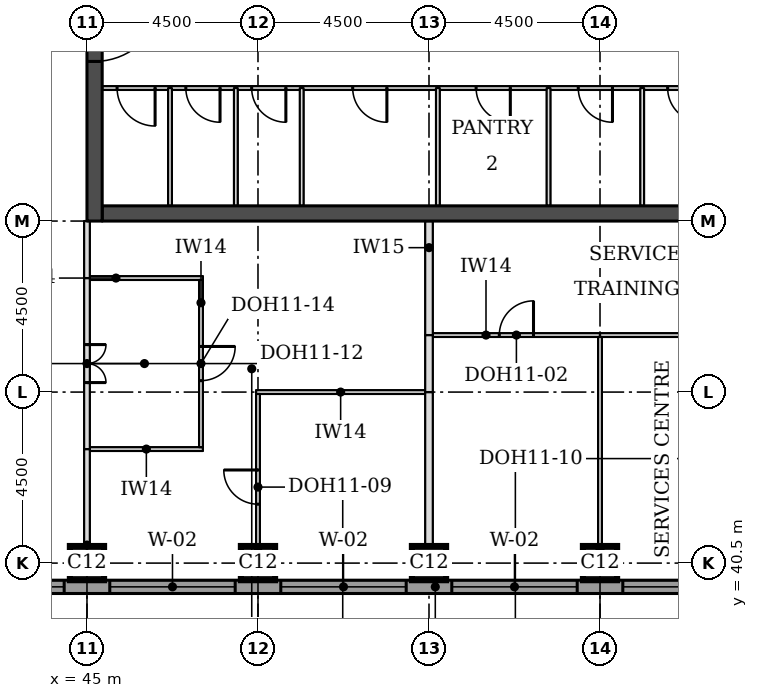
"""IFC4 building model, lengths in metres.
Left out: names, types, materials, properties, quantities, classifications, styles, units other than length and angle.
Written with IfcOpenShell. Run it as: python <this file> out.ifc"""

import sys

from ifc_helpers import new_model, si_unit, direction, frame, frame_2d, origin, origin_2d, place, context, subcontext, project, spatial, rectangle, extrude, element, fill, save


model = new_model("IFC4")
c1 = context("Model", 3, precision=1e-05, world=origin(), true_north=direction((0.0, 1.0)))
c2 = subcontext(c1, "Body", "Model", "MODEL_VIEW")
j1 = project(units=[si_unit("LENGTHUNIT", "METRE"), si_unit("PLANEANGLEUNIT", "RADIAN")], contexts=[c1])
p1 = place(None, origin())
s1 = spatial("IfcSite", under=j1, at=p1, CompositionType="ELEMENT")
p2 = place(p1, origin())
s2 = spatial("IfcBuilding", under=s1, at=p2, CompositionType="ELEMENT")
p3 = place(p2, frame((0.0, 0.0, 234.1)))
s3 = spatial("IfcBuildingStorey", under=s2, at=p3, CompositionType="ELEMENT", Elevation=234.1)
for number, where, z_axis, x_axis in (
    (1, (45.0, 40.5, 0.0), (0.0, 0.0, 1.0), (1.0, 0.0, 0.0)),
    (2, (49.5, 40.5, 0.0), (0.0, 0.0, 1.0), (1.0, 0.0, 0.0)),
    (3, (54.0, 40.5, 0.0), (0.0, 0.0, 1.0), (1.0, 0.0, 0.0)),
    (4, (58.5, 40.5, 0.0), (0.0, 0.0, 1.0), (1.0, 0.0, 0.0)),
):
    element("IfcColumn", number, at=place(p3, frame(where, z_axis=z_axis, x_axis=x_axis)), inside=s3, PredefinedType="COLUMN", context=c2, shape_type="SweptSolid", body=[
        extrude(rectangle(XDim=0.9, YDim=0.9, at=origin_2d()), origin(), (0.0, 0.0, 1.0), 3.7),
    ])
p4 = place(p3, frame((45.4, 49.7, 0.0), z_axis=(0.0, 0.0, 1.0), x_axis=(1.0, 0.0, 0.0)))
e5 = element("IfcWall", 5, at=p4, inside=s3, PredefinedType="SHEAR", context=c2, shape_type="SweptSolid", body=[
    extrude(rectangle(XDim=21.7, YDim=0.4, at=frame_2d((10.85, 0.0))), origin(), (0.0, 0.0, 1.0), 3.7),
])
p5 = place(p3, frame((45.2, 49.5, 0.0), z_axis=(0.0, 0.0, 1.0), x_axis=(0.0, 1.0, 0.0)))
e6 = element("IfcWall", 6, at=p5, inside=s3, PredefinedType="SHEAR", context=c2, shape_type="SweptSolid", body=[
    extrude(rectangle(XDim=22.5, YDim=0.4, at=frame_2d((11.25, 0.0))), origin(), (0.0, 0.0, 1.0), 3.7),
])
p6 = place(p5, frame((4.2, 0.0, 0.0)))
e7 = element("IfcOpeningElement", 7, at=p6, cuts=e6, PredefinedType="OPENING", context=c2, shape_type="SweptSolid", body=[
    extrude(rectangle(XDim=1.8, YDim=2.1, at=frame_2d((0.9, 1.05))), frame((0.0, 0.21, 0.0), z_axis=(0.0, -1.0, 0.0), x_axis=(1.0, 0.0, 0.0)), (0.0, 0.0, 1.0), 0.42),
])
p7 = place(p5, frame((6.9, 0.0, 0.0)))
e8 = element("IfcOpeningElement", 8, at=p7, cuts=e6, PredefinedType="OPENING", context=c2, shape_type="SweptSolid", body=[
    extrude(rectangle(XDim=1.1, YDim=2.1, at=frame_2d((0.55, 1.05))), frame((0.0, 0.21, 0.0), z_axis=(0.0, -1.0, 0.0), x_axis=(1.0, 0.0, 0.0)), (0.0, 0.0, 1.0), 0.42),
])
p8 = place(p5, frame((13.6, 0.0, 0.0)))
e9 = element("IfcOpeningElement", 9, at=p8, cuts=e6, PredefinedType="OPENING", context=c2, shape_type="SweptSolid", body=[
    extrude(rectangle(XDim=1.1, YDim=2.1, at=frame_2d((0.55, 1.05))), frame((0.0, 0.21, 0.0), z_axis=(0.0, -1.0, 0.0), x_axis=(1.0, 0.0, 0.0)), (0.0, 0.0, 1.0), 0.42),
])
p9 = place(p5, frame((16.5, 0.0, 0.0)))
e10 = element("IfcOpeningElement", 10, at=p9, cuts=e6, PredefinedType="OPENING", context=c2, shape_type="SweptSolid", body=[
    extrude(rectangle(XDim=1.8, YDim=2.1, at=frame_2d((0.9, 1.05))), frame((0.0, 0.21, 0.0), z_axis=(0.0, -1.0, 0.0), x_axis=(1.0, 0.0, 0.0)), (0.0, 0.0, 1.0), 0.42),
])
p10 = place(p3, frame((36.0, 39.875, 0.0), z_axis=(0.0, 0.0, 1.0), x_axis=(1.0, 0.0, 0.0)))
e11 = element("IfcWall", 11, at=p10, inside=s3, PredefinedType="STANDARD", context=c2, shape_type="SweptSolid", body=[
    extrude(rectangle(XDim=36.331, YDim=0.35, at=frame_2d((18.166, 0.0))), origin(), (0.0, 0.0, 1.0), 3.525),
])
p11 = place(p10, frame((5.1, 0.0, 0.9)))
e12 = element("IfcOpeningElement", 12, at=p11, cuts=e11, PredefinedType="OPENING", context=c2, shape_type="SweptSolid", body=[
    extrude(rectangle(XDim=3.3, YDim=1.9, at=frame_2d((1.65, 0.95))), frame((0.0, 0.185, 0.0), z_axis=(0.0, -1.0, 0.0), x_axis=(1.0, 0.0, 0.0)), (0.0, 0.0, 1.0), 0.37),
])
p12 = place(p10, frame((9.6, 0.0, 0.9)))
e13 = element("IfcOpeningElement", 13, at=p12, cuts=e11, PredefinedType="OPENING", context=c2, shape_type="SweptSolid", body=[
    extrude(rectangle(XDim=3.3, YDim=1.9, at=frame_2d((1.65, 0.95))), frame((0.0, 0.185, 0.0), z_axis=(0.0, -1.0, 0.0), x_axis=(1.0, 0.0, 0.0)), (0.0, 0.0, 1.0), 0.37),
])
p13 = place(p10, frame((14.1, 0.0, 0.9)))
e14 = element("IfcOpeningElement", 14, at=p13, cuts=e11, PredefinedType="OPENING", context=c2, shape_type="SweptSolid", body=[
    extrude(rectangle(XDim=3.3, YDim=1.9, at=frame_2d((1.65, 0.95))), frame((0.0, 0.185, 0.0), z_axis=(0.0, -1.0, 0.0), x_axis=(1.0, 0.0, 0.0)), (0.0, 0.0, 1.0), 0.37),
])
p14 = place(p10, frame((18.6, 0.0, 0.9)))
e15 = element("IfcOpeningElement", 15, at=p14, cuts=e11, PredefinedType="OPENING", context=c2, shape_type="SweptSolid", body=[
    extrude(rectangle(XDim=3.3, YDim=1.9, at=frame_2d((1.65, 0.95))), frame((0.0, 0.185, 0.0), z_axis=(0.0, -1.0, 0.0), x_axis=(1.0, 0.0, 0.0)), (0.0, 0.0, 1.0), 0.37),
])
p15 = place(p10, frame((23.1, 0.0, 0.9)))
e16 = element("IfcOpeningElement", 16, at=p15, cuts=e11, PredefinedType="OPENING", context=c2, shape_type="SweptSolid", body=[
    extrude(rectangle(XDim=3.3, YDim=1.9, at=frame_2d((1.65, 0.95))), frame((0.0, 0.185, 0.0), z_axis=(0.0, -1.0, 0.0), x_axis=(1.0, 0.0, 0.0)), (0.0, 0.0, 1.0), 0.37),
])
p16 = place(p10, frame((27.6, 0.0, 0.9)))
e17 = element("IfcOpeningElement", 17, at=p16, cuts=e11, PredefinedType="OPENING", context=c2, shape_type="SweptSolid", body=[
    extrude(rectangle(XDim=3.3, YDim=1.9, at=frame_2d((1.65, 0.95))), frame((0.0, 0.185, 0.0), z_axis=(0.0, -1.0, 0.0), x_axis=(1.0, 0.0, 0.0)), (0.0, 0.0, 1.0), 0.37),
])
p17 = place(p3, frame((45.075, 43.5, 0.0), z_axis=(0.0, 0.0, 1.0), x_axis=(1.0, 0.0, 0.0)))
e18 = element("IfcWall", 18, at=p17, inside=s3, PredefinedType="PARTITIONING", context=c2, shape_type="SweptSolid", body=[
    extrude(rectangle(XDim=2.975, YDim=0.1, at=frame_2d((1.488, 0.0))), origin(), (0.0, 0.0, 1.0), 3.55),
])
p18 = place(p3, frame((49.45, 45.0, 0.0), z_axis=(0.0, 0.0, 1.0), x_axis=(1.0, 0.0, 0.0)))
e19 = element("IfcWall", 19, at=p18, inside=s3, PredefinedType="PARTITIONING", context=c2, shape_type="SweptSolid", body=[
    extrude(rectangle(XDim=4.45, YDim=0.1, at=frame_2d((2.225, 0.0))), origin(), (0.0, 0.0, 1.0), 3.55),
])
p19 = place(p3, frame((54.1, 46.5, 0.0), z_axis=(0.0, 0.0, 1.0), x_axis=(1.0, 0.0, 0.0)))
e20 = element("IfcWall", 20, at=p19, inside=s3, PredefinedType="PARTITIONING", context=c2, shape_type="SweptSolid", body=[
    extrude(rectangle(XDim=4.4, YDim=0.1, at=frame_2d((2.2, 0.0))), origin(), (0.0, 0.0, 1.0), 3.55),
])
p20 = place(p19, frame((1.75, 0.0, 0.0)))
e21 = element("IfcOpeningElement", 21, at=p20, cuts=e20, PredefinedType="OPENING", context=c2, shape_type="SweptSolid", body=[
    extrude(rectangle(XDim=0.9, YDim=2.1, at=frame_2d((0.45, 1.05))), frame((0.0, 0.06, 0.0), z_axis=(0.0, -1.0, 0.0), x_axis=(1.0, 0.0, 0.0)), (0.0, 0.0, 1.0), 0.12),
])
p21 = place(p3, frame((58.5, 46.5, 0.0), z_axis=(0.0, 0.0, 1.0), x_axis=(1.0, 0.0, 0.0)))
e22 = element("IfcWall", 22, at=p21, inside=s3, PredefinedType="PARTITIONING", context=c2, shape_type="SweptSolid", body=[
    extrude(rectangle(XDim=4.55, YDim=0.1, at=frame_2d((2.275, 0.0))), origin(), (0.0, 0.0, 1.0), 3.55),
])
p22 = place(p3, frame((45.075, 48.0, 0.0), z_axis=(0.0, 0.0, 1.0), x_axis=(1.0, 0.0, 0.0)))
e23 = element("IfcWall", 23, at=p22, inside=s3, PredefinedType="PARTITIONING", context=c2, shape_type="SweptSolid", body=[
    extrude(rectangle(XDim=2.975, YDim=0.1, at=frame_2d((1.488, 0.0))), origin(), (0.0, 0.0, 1.0), 3.55),
])
p23 = place(p3, frame((45.0, 40.05, 0.0), z_axis=(0.0, 0.0, 1.0), x_axis=(0.0, 1.0, 0.0)))
e24 = element("IfcWall", 24, at=p23, inside=s3, PredefinedType="PARTITIONING", context=c2, shape_type="SweptSolid", body=[
    extrude(rectangle(XDim=3.45, YDim=0.15, at=frame_2d((1.725, 0.0))), origin(), (0.0, 0.0, 1.0), 3.022),
])
p24 = place(p3, frame((49.5, 40.05, 0.0), z_axis=(0.0, 0.0, 1.0), x_axis=(0.0, 1.0, 0.0)))
e25 = element("IfcWall", 25, at=p24, inside=s3, PredefinedType="PARTITIONING", context=c2, shape_type="SweptSolid", body=[
    extrude(rectangle(XDim=4.9, YDim=0.1, at=frame_2d((2.45, 0.0))), origin(), (0.0, 0.0, 1.0), 3.55),
])
p25 = place(p24, frame((2.0, 0.0, 0.0)))
e26 = element("IfcOpeningElement", 26, at=p25, cuts=e25, PredefinedType="OPENING", context=c2, shape_type="SweptSolid", body=[
    extrude(rectangle(XDim=0.9, YDim=2.1, at=frame_2d((0.45, 1.05))), frame((0.0, 0.06, 0.0), z_axis=(0.0, -1.0, 0.0), x_axis=(1.0, 0.0, 0.0)), (0.0, 0.0, 1.0), 0.12),
])
p26 = place(p3, frame((54.0, 40.05, 0.0), z_axis=(0.0, 0.0, 1.0), x_axis=(0.0, 1.0, 0.0)))
e27 = element("IfcWall", 27, at=p26, inside=s3, PredefinedType="PARTITIONING", context=c2, shape_type="SweptSolid", body=[
    extrude(rectangle(XDim=4.95, YDim=0.2, at=frame_2d((2.475, 0.0))), origin(), (0.0, 0.0, 1.0), 3.55),
])
p27 = place(p3, frame((58.5, 40.05, 0.0), z_axis=(0.0, 0.0, 1.0), x_axis=(0.0, 1.0, 0.0)))
e28 = element("IfcWall", 28, at=p27, inside=s3, PredefinedType="PARTITIONING", context=c2, shape_type="SweptSolid", body=[
    extrude(rectangle(XDim=6.4, YDim=0.1, at=frame_2d((3.2, 0.0))), origin(), (0.0, 0.0, 1.0), 3.55),
])
p28 = place(p3, frame((45.0, 43.5, 0.0), z_axis=(0.0, 0.0, 1.0), x_axis=(0.0, 1.0, 0.0)))
e29 = element("IfcWall", 29, at=p28, inside=s3, PredefinedType="PARTITIONING", context=c2, shape_type="SweptSolid", body=[
    extrude(rectangle(XDim=4.5, YDim=0.15, at=frame_2d((2.25, 0.0))), origin(), (0.0, 0.0, 1.0), 3.022),
])
p29 = place(p28, frame((1.75, 0.0, 0.0)))
e30 = element("IfcOpeningElement", 30, at=p29, cuts=e29, PredefinedType="OPENING", context=c2, shape_type="SweptSolid", body=[
    extrude(rectangle(XDim=1.0, YDim=2.1, at=frame_2d((0.5, 1.05))), frame((0.0, 0.085, 0.0), z_axis=(0.0, -1.0, 0.0), x_axis=(1.0, 0.0, 0.0)), (0.0, 0.0, 1.0), 0.17),
])
p30 = place(p3, frame((48.0, 43.55, 0.0), z_axis=(0.0, 0.0, 1.0), x_axis=(0.0, 1.0, 0.0)))
e31 = element("IfcWall", 31, at=p30, inside=s3, PredefinedType="PARTITIONING", context=c2, shape_type="SweptSolid", body=[
    extrude(rectangle(XDim=4.4, YDim=0.1, at=frame_2d((2.2, 0.0))), origin(), (0.0, 0.0, 1.0), 3.55),
])
p31 = place(p30, frame((1.75, 0.0, 0.0)))
e32 = element("IfcOpeningElement", 32, at=p31, cuts=e31, PredefinedType="OPENING", context=c2, shape_type="SweptSolid", body=[
    extrude(rectangle(XDim=0.9, YDim=2.1, at=frame_2d((0.45, 1.05))), frame((0.0, 0.06, 0.0), z_axis=(0.0, -1.0, 0.0), x_axis=(1.0, 0.0, 0.0)), (0.0, 0.0, 1.0), 0.12),
])
p32 = place(p3, frame((54.0, 45.0, 0.0), z_axis=(0.0, 0.0, 1.0), x_axis=(0.0, 1.0, 0.0)))
e33 = element("IfcWall", 33, at=p32, inside=s3, PredefinedType="PARTITIONING", context=c2, shape_type="SweptSolid", body=[
    extrude(rectangle(XDim=1.5, YDim=0.2, at=frame_2d((0.75, 0.0))), origin(), (0.0, 0.0, 1.0), 3.55),
])
p33 = place(p3, frame((54.0, 46.5, 0.0), z_axis=(0.0, 0.0, 1.0), x_axis=(0.0, 1.0, 0.0)))
e34 = element("IfcWall", 34, at=p33, inside=s3, PredefinedType="PARTITIONING", context=c2, shape_type="SweptSolid", body=[
    extrude(rectangle(XDim=3.0, YDim=0.2, at=frame_2d((1.5, 0.0))), origin(), (0.0, 0.0, 1.0), 3.55),
])
p34 = place(p3, frame((45.0, 48.0, 0.0), z_axis=(0.0, 0.0, 1.0), x_axis=(0.0, 1.0, 0.0)))
e35 = element("IfcWall", 35, at=p34, inside=s3, PredefinedType="PARTITIONING", context=c2, shape_type="SweptSolid", body=[
    extrude(rectangle(XDim=1.5, YDim=0.15, at=frame_2d((0.75, 0.0))), origin(), (0.0, 0.0, 1.0), 3.022),
])
p35 = place(p3, frame((45.4, 53.0, 0.0), z_axis=(0.0, 0.0, 1.0), x_axis=(1.0, 0.0, 0.0)))
e36 = element("IfcWall", 36, at=p35, inside=s3, PredefinedType="PARTITIONING", context=c2, shape_type="SweptSolid", body=[
    extrude(rectangle(XDim=21.7, YDim=0.1, at=frame_2d((10.85, 0.0))), origin(), (0.0, 0.0, 1.0), 3.55),
])
p36 = place(p35, frame((18.625, 0.0, 0.0)))
e37 = element("IfcOpeningElement", 37, at=p36, cuts=e36, PredefinedType="OPENING", context=c2, shape_type="SweptSolid", body=[
    extrude(rectangle(XDim=0.9, YDim=2.1, at=frame_2d((0.45, 1.05))), frame((0.0, 0.06, 0.0), z_axis=(0.0, -1.0, 0.0), x_axis=(1.0, 0.0, 0.0)), (0.0, 0.0, 1.0), 0.12),
])
p37 = place(p35, frame((0.393, 0.0, 0.0)))
e38 = element("IfcOpeningElement", 38, at=p37, cuts=e36, PredefinedType="OPENING", context=c2, shape_type="SweptSolid", body=[
    extrude(rectangle(XDim=1.0, YDim=2.1, at=frame_2d((0.5, 1.05))), frame((0.0, 0.06, 0.0), z_axis=(0.0, -1.0, 0.0), x_axis=(1.0, 0.0, 0.0)), (0.0, 0.0, 1.0), 0.12),
])
p38 = place(p35, frame((2.201, 0.0, 0.0)))
e39 = element("IfcOpeningElement", 39, at=p38, cuts=e36, PredefinedType="OPENING", context=c2, shape_type="SweptSolid", body=[
    extrude(rectangle(XDim=0.9, YDim=2.1, at=frame_2d((0.45, 1.05))), frame((0.0, 0.06, 0.0), z_axis=(0.0, -1.0, 0.0), x_axis=(1.0, 0.0, 0.0)), (0.0, 0.0, 1.0), 0.12),
])
p39 = place(p35, frame((3.934, 0.0, 0.0)))
e40 = element("IfcOpeningElement", 40, at=p39, cuts=e36, PredefinedType="OPENING", context=c2, shape_type="SweptSolid", body=[
    extrude(rectangle(XDim=0.9, YDim=2.1, at=frame_2d((0.45, 1.05))), frame((0.0, 0.06, 0.0), z_axis=(0.0, -1.0, 0.0), x_axis=(1.0, 0.0, 0.0)), (0.0, 0.0, 1.0), 0.12),
])
p40 = place(p35, frame((6.592, 0.0, 0.0)))
e41 = element("IfcOpeningElement", 41, at=p40, cuts=e36, PredefinedType="OPENING", context=c2, shape_type="SweptSolid", body=[
    extrude(rectangle(XDim=0.9, YDim=2.1, at=frame_2d((0.45, 1.05))), frame((0.0, 0.06, 0.0), z_axis=(0.0, -1.0, 0.0), x_axis=(1.0, 0.0, 0.0)), (0.0, 0.0, 1.0), 0.12),
])
p41 = place(p35, frame((9.84, 0.0, 0.0)))
e42 = element("IfcOpeningElement", 42, at=p41, cuts=e36, PredefinedType="OPENING", context=c2, shape_type="SweptSolid", body=[
    extrude(rectangle(XDim=0.9, YDim=2.1, at=frame_2d((0.45, 1.05))), frame((0.0, 0.06, 0.0), z_axis=(0.0, -1.0, 0.0), x_axis=(1.0, 0.0, 0.0)), (0.0, 0.0, 1.0), 0.12),
])
p42 = place(p35, frame((12.528, 0.0, 0.0)))
e43 = element("IfcOpeningElement", 43, at=p42, cuts=e36, PredefinedType="OPENING", context=c2, shape_type="SweptSolid", body=[
    extrude(rectangle(XDim=0.9, YDim=2.1, at=frame_2d((0.45, 1.05))), frame((0.0, 0.06, 0.0), z_axis=(0.0, -1.0, 0.0), x_axis=(1.0, 0.0, 0.0)), (0.0, 0.0, 1.0), 0.12),
])
p43 = place(p35, frame((14.88, 0.0, 0.0)))
e44 = element("IfcOpeningElement", 44, at=p43, cuts=e36, PredefinedType="OPENING", context=c2, shape_type="SweptSolid", body=[
    extrude(rectangle(XDim=0.9, YDim=2.1, at=frame_2d((0.45, 1.05))), frame((0.0, 0.06, 0.0), z_axis=(0.0, -1.0, 0.0), x_axis=(1.0, 0.0, 0.0)), (0.0, 0.0, 1.0), 0.12),
])
for number, where, z_axis, x_axis in (
    (45, (47.185, 49.9, 0.0), (0.0, 0.0, 1.0), (0.0, 1.0, 0.0)),
    (46, (48.917, 49.9, 0.0), (0.0, 0.0, 1.0), (0.0, 1.0, 0.0)),
    (47, (50.65, 49.9, 0.0), (0.0, 0.0, 1.0), (0.0, 1.0, 0.0)),
    (48, (54.234, 49.9, 0.0), (0.0, 0.0, 1.0), (0.0, 1.0, 0.0)),
    (49, (57.146, 49.9, 0.0), (0.0, 0.0, 1.0), (0.0, 1.0, 0.0)),
    (50, (59.61, 49.9, 0.0), (0.0, 0.0, 1.0), (0.0, 1.0, 0.0)),
):
    element("IfcWall", number, at=place(p3, frame(where, z_axis=z_axis, x_axis=x_axis)), inside=s3, PredefinedType="PARTITIONING", context=c2, shape_type="SweptSolid", body=[
        extrude(rectangle(XDim=3.1, YDim=0.1, at=frame_2d((1.55, 0.0))), origin(), (0.0, 0.0, 1.0), 3.55),
    ])
p44 = place(p11, origin())
e51 = element("IfcWindow", 51, at=p44, inside=s3, PartitioningType="SINGLE_PANEL", PredefinedType="WINDOW", context=c2, shape_type="SweptSolid", body=[
    extrude(rectangle(XDim=3.3, YDim=1.9, at=frame_2d((1.65, 0.95))), frame((0.0, 0.085, 0.0), z_axis=(0.0, -1.0, 0.0), x_axis=(1.0, 0.0, 0.0)), (0.0, 0.0, 1.0), 0.06),
])
fill(e12, e51)
p45 = place(p12, origin())
e52 = element("IfcWindow", 52, at=p45, inside=s3, PartitioningType="SINGLE_PANEL", PredefinedType="WINDOW", context=c2, shape_type="SweptSolid", body=[
    extrude(rectangle(XDim=3.3, YDim=1.9, at=frame_2d((1.65, 0.95))), frame((0.0, 0.085, 0.0), z_axis=(0.0, -1.0, 0.0), x_axis=(1.0, 0.0, 0.0)), (0.0, 0.0, 1.0), 0.06),
])
fill(e13, e52)
p46 = place(p13, origin())
e53 = element("IfcWindow", 53, at=p46, inside=s3, PartitioningType="SINGLE_PANEL", PredefinedType="WINDOW", context=c2, shape_type="SweptSolid", body=[
    extrude(rectangle(XDim=3.3, YDim=1.9, at=frame_2d((1.65, 0.95))), frame((0.0, 0.085, 0.0), z_axis=(0.0, -1.0, 0.0), x_axis=(1.0, 0.0, 0.0)), (0.0, 0.0, 1.0), 0.06),
])
fill(e14, e53)
p47 = place(p14, origin())
e54 = element("IfcWindow", 54, at=p47, inside=s3, PartitioningType="SINGLE_PANEL", PredefinedType="WINDOW", context=c2, shape_type="SweptSolid", body=[
    extrude(rectangle(XDim=3.3, YDim=1.9, at=frame_2d((1.65, 0.95))), frame((0.0, 0.085, 0.0), z_axis=(0.0, -1.0, 0.0), x_axis=(1.0, 0.0, 0.0)), (0.0, 0.0, 1.0), 0.06),
])
fill(e15, e54)
p48 = place(p15, origin())
e55 = element("IfcWindow", 55, at=p48, inside=s3, PartitioningType="SINGLE_PANEL", PredefinedType="WINDOW", context=c2, shape_type="SweptSolid", body=[
    extrude(rectangle(XDim=3.3, YDim=1.9, at=frame_2d((1.65, 0.95))), frame((0.0, 0.085, 0.0), z_axis=(0.0, -1.0, 0.0), x_axis=(1.0, 0.0, 0.0)), (0.0, 0.0, 1.0), 0.06),
])
fill(e16, e55)
p49 = place(p29, frame((1.0, 0.0, 0.0), z_axis=(0.0, 0.0, 1.0), x_axis=(-1.0, 0.0, 0.0)))
e56 = element("IfcDoor", 56, at=p49, inside=s3, OperationType="DOUBLE_DOOR_SINGLE_SWING", PredefinedType="DOOR", context=c2, shape_type="SweptSolid", body=[
    extrude(rectangle(XDim=1.0, YDim=2.1, at=frame_2d((0.5, 1.05))), frame((0.0, 0.025, 0.0), z_axis=(0.0, -1.0, 0.0), x_axis=(1.0, 0.0, 0.0)), (0.0, 0.0, 1.0), 0.05),
])
fill(e30, e56)
p50 = place(p31, frame((0.9, 0.0, 0.0), z_axis=(0.0, 0.0, 1.0), x_axis=(-1.0, 0.0, 0.0)))
e57 = element("IfcDoor", 57, at=p50, inside=s3, OperationType="SINGLE_SWING_LEFT", PredefinedType="DOOR", context=c2, shape_type="SweptSolid", body=[
    extrude(rectangle(XDim=0.9, YDim=2.1, at=frame_2d((0.45, 1.05))), frame((0.0, 0.025, 0.0), z_axis=(0.0, -1.0, 0.0), x_axis=(1.0, 0.0, 0.0)), (0.0, 0.0, 1.0), 0.05),
])
fill(e32, e57)
p51 = place(p25, origin())
e58 = element("IfcDoor", 58, at=p51, inside=s3, OperationType="SINGLE_SWING_RIGHT", PredefinedType="DOOR", context=c2, shape_type="SweptSolid", body=[
    extrude(rectangle(XDim=0.9, YDim=2.1, at=frame_2d((0.45, 1.05))), frame((0.0, 0.025, 0.0), z_axis=(0.0, -1.0, 0.0), x_axis=(1.0, 0.0, 0.0)), (0.0, 0.0, 1.0), 0.05),
])
fill(e26, e58)
p52 = place(p20, origin())
e59 = element("IfcDoor", 59, at=p52, inside=s3, OperationType="SINGLE_SWING_RIGHT", PredefinedType="DOOR", context=c2, shape_type="SweptSolid", body=[
    extrude(rectangle(XDim=0.9, YDim=2.1, at=frame_2d((0.45, 1.05))), frame((0.0, 0.025, 0.0), z_axis=(0.0, -1.0, 0.0), x_axis=(1.0, 0.0, 0.0)), (0.0, 0.0, 1.0), 0.05),
])
fill(e21, e59)
p53 = place(p6, frame((1.8, 0.0, 0.0), z_axis=(0.0, 0.0, 1.0), x_axis=(-1.0, 0.0, 0.0)))
e60 = element("IfcDoor", 60, at=p53, inside=s3, OperationType="SINGLE_SWING_LEFT", PredefinedType="DOOR", context=c2, shape_type="SweptSolid", body=[
    extrude(rectangle(XDim=1.8, YDim=2.1, at=frame_2d((0.9, 1.05))), frame((0.0, 0.025, 0.0), z_axis=(0.0, -1.0, 0.0), x_axis=(1.0, 0.0, 0.0)), (0.0, 0.0, 1.0), 0.05),
])
fill(e7, e60)
p54 = place(p37, frame((1.0, 0.0, 0.0), z_axis=(0.0, 0.0, 1.0), x_axis=(-1.0, 0.0, 0.0)))
e61 = element("IfcDoor", 61, at=p54, inside=s3, OperationType="SINGLE_SWING_LEFT", PredefinedType="DOOR", context=c2, shape_type="SweptSolid", body=[
    extrude(rectangle(XDim=1.0, YDim=2.1, at=frame_2d((0.5, 1.05))), frame((0.0, 0.025, 0.0), z_axis=(0.0, -1.0, 0.0), x_axis=(1.0, 0.0, 0.0)), (0.0, 0.0, 1.0), 0.05),
])
fill(e38, e61)
p55 = place(p38, frame((0.9, 0.0, 0.0), z_axis=(0.0, 0.0, 1.0), x_axis=(-1.0, 0.0, 0.0)))
e62 = element("IfcDoor", 62, at=p55, inside=s3, OperationType="SINGLE_SWING_LEFT", PredefinedType="DOOR", context=c2, shape_type="SweptSolid", body=[
    extrude(rectangle(XDim=0.9, YDim=2.1, at=frame_2d((0.45, 1.05))), frame((0.0, 0.025, 0.0), z_axis=(0.0, -1.0, 0.0), x_axis=(1.0, 0.0, 0.0)), (0.0, 0.0, 1.0), 0.05),
])
fill(e39, e62)
p56 = place(p39, frame((0.9, 0.0, 0.0), z_axis=(0.0, 0.0, 1.0), x_axis=(-1.0, 0.0, 0.0)))
e63 = element("IfcDoor", 63, at=p56, inside=s3, OperationType="SINGLE_SWING_LEFT", PredefinedType="DOOR", context=c2, shape_type="SweptSolid", body=[
    extrude(rectangle(XDim=0.9, YDim=2.1, at=frame_2d((0.45, 1.05))), frame((0.0, 0.025, 0.0), z_axis=(0.0, -1.0, 0.0), x_axis=(1.0, 0.0, 0.0)), (0.0, 0.0, 1.0), 0.05),
])
fill(e40, e63)
p57 = place(p40, frame((0.9, 0.0, 0.0), z_axis=(0.0, 0.0, 1.0), x_axis=(-1.0, 0.0, 0.0)))
e64 = element("IfcDoor", 64, at=p57, inside=s3, OperationType="SINGLE_SWING_LEFT", PredefinedType="DOOR", context=c2, shape_type="SweptSolid", body=[
    extrude(rectangle(XDim=0.9, YDim=2.1, at=frame_2d((0.45, 1.05))), frame((0.0, 0.025, 0.0), z_axis=(0.0, -1.0, 0.0), x_axis=(1.0, 0.0, 0.0)), (0.0, 0.0, 1.0), 0.05),
])
fill(e41, e64)
p58 = place(p41, frame((0.9, 0.0, 0.0), z_axis=(0.0, 0.0, 1.0), x_axis=(-1.0, 0.0, 0.0)))
e65 = element("IfcDoor", 65, at=p58, inside=s3, OperationType="SINGLE_SWING_LEFT", PredefinedType="DOOR", context=c2, shape_type="SweptSolid", body=[
    extrude(rectangle(XDim=0.9, YDim=2.1, at=frame_2d((0.45, 1.05))), frame((0.0, 0.025, 0.0), z_axis=(0.0, -1.0, 0.0), x_axis=(1.0, 0.0, 0.0)), (0.0, 0.0, 1.0), 0.05),
])
fill(e42, e65)
p59 = place(p42, frame((0.9, 0.0, 0.0), z_axis=(0.0, 0.0, 1.0), x_axis=(-1.0, 0.0, 0.0)))
e66 = element("IfcDoor", 66, at=p59, inside=s3, OperationType="SINGLE_SWING_LEFT", PredefinedType="DOOR", context=c2, shape_type="SweptSolid", body=[
    extrude(rectangle(XDim=0.9, YDim=2.1, at=frame_2d((0.45, 1.05))), frame((0.0, 0.025, 0.0), z_axis=(0.0, -1.0, 0.0), x_axis=(1.0, 0.0, 0.0)), (0.0, 0.0, 1.0), 0.05),
])
fill(e43, e66)
p60 = place(p43, frame((0.9, 0.0, 0.0), z_axis=(0.0, 0.0, 1.0), x_axis=(-1.0, 0.0, 0.0)))
e67 = element("IfcDoor", 67, at=p60, inside=s3, OperationType="SINGLE_SWING_LEFT", PredefinedType="DOOR", context=c2, shape_type="SweptSolid", body=[
    extrude(rectangle(XDim=0.9, YDim=2.1, at=frame_2d((0.45, 1.05))), frame((0.0, 0.025, 0.0), z_axis=(0.0, -1.0, 0.0), x_axis=(1.0, 0.0, 0.0)), (0.0, 0.0, 1.0), 0.05),
])
fill(e44, e67)
save(model, sys.argv[1])
